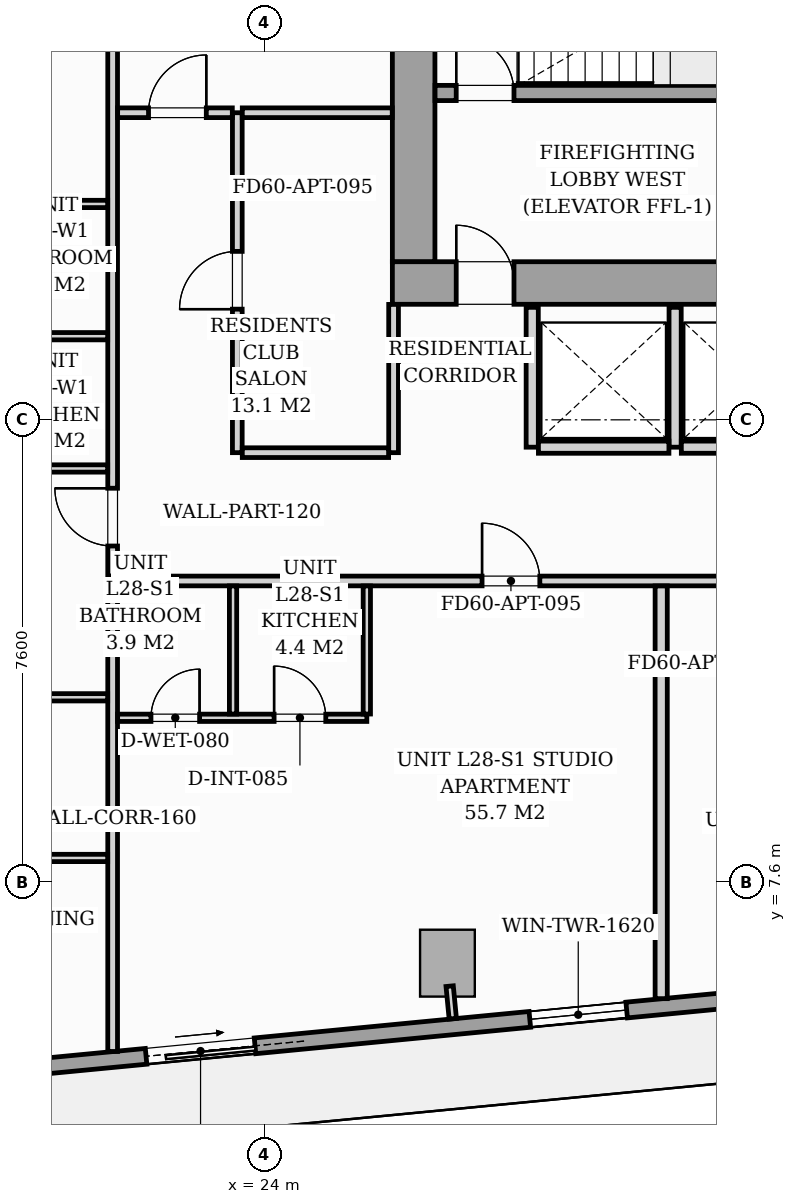
"""IFC4 building model, lengths in metres.
Left out: names, types, materials, properties, quantities, classifications, styles, units other than length and angle.
Written with IfcOpenShell. Run it as: python <this file> out.ifc"""

import sys

from ifc_helpers import new_model, si_unit, direction, frame, frame_2d, origin, origin_2d, place, context, subcontext, project, spatial, rectangle, i_section, extrude, source, transform, mapped, element, fill, save


model = new_model("IFC4")
c1 = context("Model", 3, precision=1e-05, world=origin(), true_north=direction((0.0, 1.0)))
c2 = subcontext(c1, "Body", "Model", "MODEL_VIEW")
j1 = project(units=[si_unit("LENGTHUNIT", "METRE"), si_unit("PLANEANGLEUNIT", "RADIAN")], contexts=[c1])
p1 = place(None, origin())
s1 = spatial("IfcSite", under=j1, at=p1, CompositionType="ELEMENT")
p2 = place(p1, origin())
s2 = spatial("IfcBuilding", under=s1, at=p2, CompositionType="ELEMENT")
p3 = place(p2, frame((0.0, 0.0, 100.2)))
s3 = spatial("IfcBuildingStorey", under=s2, at=p3, CompositionType="ELEMENT", Elevation=100.2)
m1 = source(origin(), c2, "Body", "SweptSolid", [
    extrude(i_section(OverallWidth=0.427, OverallDepth=0.483, WebThickness=0.051, FlangeThickness=0.082, FilletRadius=0.018, at=origin_2d()), origin(), (0.0, 0.0, 1.0), 3.196),
])
p4 = place(p3, frame((26.4, 17.4, 0.002), z_axis=(0.0, 0.0, 1.0), x_axis=(1.0, 0.0, 0.0)))
e1 = element("IfcColumn", 1, at=p4, inside=s3, PredefinedType="PILASTER", context=c2, shape_type="MappedRepresentation", body=[
    mapped(m1, transform((0.0, 0.0, 0.0), scale=1.0)),
])
m2 = source(origin(), c2, "Body", "SweptSolid", [
    extrude(rectangle(XDim=0.9, YDim=1.1, at=origin_2d()), origin(), (0.0, 0.0, 1.0), 3.196),
])
p5 = place(p3, frame((27.006, 6.265, 0.002), z_axis=(0.0, 0.0, 1.0), x_axis=(0.995396198367, 0.09584575252, 0.0)))
e2 = element("IfcColumn", 2, at=p5, inside=s3, PredefinedType="COLUMN", context=c2, shape_type="MappedRepresentation", body=[
    mapped(m2, transform((0.0, 0.0, 0.0), scale=1.0)),
])
p6 = place(p3, frame((31.994, 5.69, 0.0), z_axis=(0.0, 0.0, 1.0), x_axis=(-0.995396521236, -0.095842399342, 0.0)))
e3 = element("IfcWall", 3, at=p6, inside=s3, PredefinedType="STANDARD", context=c2, shape_type="SweptSolid", body=[
    extrude(rectangle(XDim=19.11, YDim=0.26, at=frame_2d((9.555, 0.0))), origin(), (0.0, 0.0, 1.0), 2.94),
])
p7 = place(p6, frame((8.19, 0.0, 0.0)))
e4 = element("IfcOpeningElement", 4, at=p7, cuts=e3, PredefinedType="OPENING", context=c2, shape_type="SweptSolid", body=[
    extrude(rectangle(XDim=1.8, YDim=2.06, at=frame_2d((0.9, 1.03))), frame((0.0, 0.14, 0.0), z_axis=(0.0, -1.0, 0.0), x_axis=(1.0, 0.0, 0.0)), (0.0, 0.0, 1.0), 0.28),
])
p8 = place(p6, frame((2.05, 0.0, 0.65)))
e5 = element("IfcOpeningElement", 5, at=p8, cuts=e3, PredefinedType="OPENING", context=c2, shape_type="SweptSolid", body=[
    extrude(rectangle(XDim=1.6, YDim=1.5, at=frame_2d((0.8, 0.75))), frame((0.0, 0.14, 0.0), z_axis=(0.0, -1.0, 0.0), x_axis=(1.0, 0.0, 0.0)), (0.0, 0.0, 1.0), 0.28),
])
p9 = place(p3, frame((26.1, 17.45, 0.0), z_axis=(0.0, 0.0, 1.0), x_axis=(1.0, 0.0, 0.0)))
e6 = element("IfcWall", 6, at=p9, inside=s3, PredefinedType="SHEAR", context=c2, shape_type="SweptSolid", body=[
    extrude(rectangle(XDim=19.8, YDim=0.7, at=frame_2d((9.9, 0.0))), origin(), (0.0, 0.0, 1.0), 3.2),
])
p10 = place(p9, frame((1.05, 0.0, 0.0)))
e7 = element("IfcOpeningElement", 7, at=p10, cuts=e6, PredefinedType="OPENING", context=c2, shape_type="SweptSolid", body=[
    extrude(rectangle(XDim=0.95, YDim=2.06, at=frame_2d((0.475, 1.03))), frame((0.0, 0.36, 0.0), z_axis=(0.0, -1.0, 0.0), x_axis=(1.0, 0.0, 0.0)), (0.0, 0.0, 1.0), 0.72),
])
p11 = place(p9, frame((9.48, 0.0, 0.0)))
e8 = element("IfcOpeningElement", 8, at=p11, cuts=e6, PredefinedType="OPENING", context=c2, shape_type="SweptSolid", body=[
    extrude(rectangle(XDim=0.85, YDim=2.0, at=frame_2d((0.425, 1.0))), frame((0.0, 0.36, 0.0), z_axis=(0.0, -1.0, 0.0), x_axis=(1.0, 0.0, 0.0)), (0.0, 0.0, 1.0), 0.72),
])
p12 = place(p9, frame((17.65, 0.0, 0.0)))
e9 = element("IfcOpeningElement", 9, at=p12, cuts=e6, PredefinedType="OPENING", context=c2, shape_type="SweptSolid", body=[
    extrude(rectangle(XDim=0.95, YDim=2.06, at=frame_2d((0.475, 1.03))), frame((0.0, 0.36, 0.0), z_axis=(0.0, -1.0, 0.0), x_axis=(1.0, 0.0, 0.0)), (0.0, 0.0, 1.0), 0.72),
])
p13 = place(p3, frame((26.45, 17.802, 0.0), z_axis=(0.0, 0.0, 1.0), x_axis=(0.0, 1.0, 0.0)))
e10 = element("IfcWall", 10, at=p13, inside=s3, PredefinedType="SHEAR", context=c2, shape_type="SweptSolid", body=[
    extrude(rectangle(XDim=5.796, YDim=0.7, at=frame_2d((2.898, 0.0))), origin(), (0.0, 0.0, 1.0), 3.2),
])
p14 = place(p3, frame((26.802, 20.575, 0.0), z_axis=(0.0, 0.0, 1.0), x_axis=(1.0, 0.0, 0.0)))
e11 = element("IfcWall", 11, at=p14, inside=s3, PredefinedType="SOLIDWALL", context=c2, shape_type="SweptSolid", body=[
    extrude(rectangle(XDim=8.148, YDim=0.25, at=frame_2d((4.074, 0.0))), origin(), (0.0, 0.0, 1.0), 3.2),
])
p15 = place(p14, frame((0.348, 0.0, 0.0)))
e12 = element("IfcOpeningElement", 12, at=p15, cuts=e11, PredefinedType="OPENING", context=c2, shape_type="SweptSolid", body=[
    extrude(rectangle(XDim=0.95, YDim=2.06, at=frame_2d((0.475, 1.03))), frame((0.0, 0.135, 0.0), z_axis=(0.0, -1.0, 0.0), x_axis=(1.0, 0.0, 0.0)), (0.0, 0.0, 1.0), 0.27),
])
for number, where, z_axis, x_axis in (
    (13, (28.4, 14.75, 0.0), (0.0, 0.0, 1.0), (0.0, 1.0, 0.0)),
    (14, (30.75, 14.75, 0.0), (0.0, 0.0, 1.0), (0.0, 1.0, 0.0)),
):
    element("IfcWall", number, at=place(p3, frame(where, z_axis=z_axis, x_axis=x_axis)), inside=s3, PredefinedType="PARTITIONING", context=c2, shape_type="SweptSolid", body=[
        extrude(rectangle(XDim=2.3, YDim=0.2, at=frame_2d((1.15, 0.0))), origin(), (0.0, 0.0, 1.0), 2.94),
    ])
for number, where, z_axis, x_axis in (
    (15, (28.502, 14.75, 0.0), (0.0, 0.0, 1.0), (1.0, 0.0, 0.0)),
    (16, (30.852, 14.75, 0.0), (0.0, 0.0, 1.0), (1.0, 0.0, 0.0)),
):
    element("IfcWall", number, at=place(p3, frame(where, z_axis=z_axis, x_axis=x_axis)), inside=s3, PredefinedType="PARTITIONING", context=c2, shape_type="SweptSolid", body=[
        extrude(rectangle(XDim=2.146, YDim=0.2, at=frame_2d((1.073, 0.0))), origin(), (0.0, 0.0, 1.0), 2.94),
    ])
p16 = place(p3, frame((21.5, 12.55, 0.0), z_axis=(0.0, 0.0, 1.0), x_axis=(1.0, 0.0, 0.0)))
e17 = element("IfcWall", 17, at=p16, inside=s3, PredefinedType="PARTITIONING", context=c2, shape_type="SweptSolid", body=[
    extrude(rectangle(XDim=24.38, YDim=0.16, at=frame_2d((12.19, 0.0))), origin(), (0.0, 0.0, 1.0), 2.94),
])
p17 = place(p16, frame((6.075, 0.0, 0.0)))
e18 = element("IfcOpeningElement", 18, at=p17, cuts=e17, PredefinedType="OPENING", context=c2, shape_type="SweptSolid", body=[
    extrude(rectangle(XDim=0.95, YDim=2.06, at=frame_2d((0.475, 1.03))), frame((0.0, 0.09, 0.0), z_axis=(0.0, -1.0, 0.0), x_axis=(1.0, 0.0, 0.0)), (0.0, 0.0, 1.0), 0.18),
])
p18 = place(p16, frame((10.519, 0.0, 0.0)))
e19 = element("IfcOpeningElement", 19, at=p18, cuts=e17, PredefinedType="OPENING", context=c2, shape_type="SweptSolid", body=[
    extrude(rectangle(XDim=0.95, YDim=2.06, at=frame_2d((0.475, 1.03))), frame((0.0, 0.09, 0.0), z_axis=(0.0, -1.0, 0.0), x_axis=(1.0, 0.0, 0.0)), (0.0, 0.0, 1.0), 0.18),
])
p19 = place(p16, frame((18.208, 0.0, 0.0)))
e20 = element("IfcOpeningElement", 20, at=p19, cuts=e17, PredefinedType="OPENING", context=c2, shape_type="SweptSolid", body=[
    extrude(rectangle(XDim=0.95, YDim=2.06, at=frame_2d((0.475, 1.03))), frame((0.0, 0.09, 0.0), z_axis=(0.0, -1.0, 0.0), x_axis=(1.0, 0.0, 0.0)), (0.0, 0.0, 1.0), 0.18),
])
p20 = place(p3, frame((21.5, 4.812, 0.0), z_axis=(0.0, 0.0, 1.0), x_axis=(0.0, 1.0, 0.0)))
e21 = element("IfcWall", 21, at=p20, inside=s3, PredefinedType="PARTITIONING", context=c2, shape_type="SweptSolid", body=[
    extrude(rectangle(XDim=7.656, YDim=0.16, at=frame_2d((3.828, 0.0))), origin(), (0.0, 0.0, 1.0), 2.94),
])
p21 = place(p3, frame((21.5, 12.632, 0.0), z_axis=(0.0, 0.0, 1.0), x_axis=(0.0, 1.0, 0.0)))
e22 = element("IfcWall", 22, at=p21, inside=s3, PredefinedType="PARTITIONING", context=c2, shape_type="SweptSolid", body=[
    extrude(rectangle(XDim=11.747, YDim=0.16, at=frame_2d((5.873, 0.0))), origin(), (0.0, 0.0, 1.0), 2.94),
])
p22 = place(p21, frame((0.493, 0.0, 0.0)))
e23 = element("IfcOpeningElement", 23, at=p22, cuts=e22, PredefinedType="OPENING", context=c2, shape_type="SweptSolid", body=[
    extrude(rectangle(XDim=0.95, YDim=2.06, at=frame_2d((0.475, 1.03))), frame((0.0, 0.09, 0.0), z_axis=(0.0, -1.0, 0.0), x_axis=(1.0, 0.0, 0.0)), (0.0, 0.0, 1.0), 0.18),
])
p23 = place(p3, frame((21.582, 10.3, 0.0), z_axis=(0.0, 0.0, 1.0), x_axis=(1.0, 0.0, 0.0)))
e24 = element("IfcWall", 24, at=p23, inside=s3, PredefinedType="PARTITIONING", context=c2, shape_type="SweptSolid", body=[
    extrude(rectangle(XDim=4.098, YDim=0.12, at=frame_2d((2.049, 0.0))), origin(), (0.0, 0.0, 1.0), 2.94),
])
p24 = place(p23, frame((0.548, 0.0, 0.0)))
e25 = element("IfcOpeningElement", 25, at=p24, cuts=e24, PredefinedType="OPENING", context=c2, shape_type="SweptSolid", body=[
    extrude(rectangle(XDim=0.8, YDim=2.02, at=frame_2d((0.4, 1.01))), frame((0.0, 0.07, 0.0), z_axis=(0.0, -1.0, 0.0), x_axis=(1.0, 0.0, 0.0)), (0.0, 0.0, 1.0), 0.14),
])
p25 = place(p23, frame((2.573, 0.0, 0.0)))
e26 = element("IfcOpeningElement", 26, at=p25, cuts=e24, PredefinedType="OPENING", context=c2, shape_type="SweptSolid", body=[
    extrude(rectangle(XDim=0.85, YDim=2.05, at=frame_2d((0.425, 1.025))), frame((0.0, 0.07, 0.0), z_axis=(0.0, -1.0, 0.0), x_axis=(1.0, 0.0, 0.0)), (0.0, 0.0, 1.0), 0.14),
])
for number, where, z_axis, x_axis in (
    (27, (25.68, 10.362, 0.0), (0.0, 0.0, 1.0), (0.0, 1.0, 0.0)),
    (28, (23.48, 10.362, 0.0), (0.0, 0.0, 1.0), (0.0, 1.0, 0.0)),
):
    element("IfcWall", number, at=place(p3, frame(where, z_axis=z_axis, x_axis=x_axis)), inside=s3, PredefinedType="PARTITIONING", context=c2, shape_type="SweptSolid", body=[
        extrude(rectangle(XDim=2.106, YDim=0.12, at=frame_2d((1.053, 0.0))), origin(), (0.0, 0.0, 1.0), 2.94),
    ])
p26 = place(p3, frame((30.521, 5.681, 0.0), z_axis=(0.0, 0.0, 1.0), x_axis=(0.0, 1.0, 0.0)))
e29 = element("IfcWall", 29, at=p26, inside=s3, PredefinedType="PARTITIONING", context=c2, shape_type="SweptSolid", body=[
    extrude(rectangle(XDim=6.787, YDim=0.2, at=frame_2d((3.394, 0.0))), origin(), (0.0, 0.0, 1.0), 2.94),
])
for number, where, z_axis, x_axis in (
    (30, (19.162, 16.575, 0.0), (0.0, 0.0, 1.0), (1.0, 0.0, 0.0)),
    (31, (19.162, 14.4, 0.0), (0.0, 0.0, 1.0), (1.0, 0.0, 0.0)),
    (32, (19.162, 18.75, 0.0), (0.0, 0.0, 1.0), (1.0, 0.0, 0.0)),
):
    element("IfcWall", number, at=place(p3, frame(where, z_axis=z_axis, x_axis=x_axis)), inside=s3, PredefinedType="PARTITIONING", context=c2, shape_type="SweptSolid", body=[
        extrude(rectangle(XDim=2.256, YDim=0.12, at=frame_2d((1.128, 0.0))), origin(), (0.0, 0.0, 1.0), 2.94),
    ])
p27 = place(p3, frame((10.142, 7.995, 0.0), z_axis=(0.0, 0.0, 1.0), x_axis=(1.0, 0.0, 0.0)))
e33 = element("IfcWall", 33, at=p27, inside=s3, PredefinedType="PARTITIONING", context=c2, shape_type="SweptSolid", body=[
    extrude(rectangle(XDim=11.276, YDim=0.12, at=frame_2d((5.638, 0.0))), origin(), (0.0, 0.0, 1.0), 2.94),
])
p28 = place(p27, frame((6.481, 0.0, 0.0)))
e34 = element("IfcOpeningElement", 34, at=p28, cuts=e33, PredefinedType="OPENING", context=c2, shape_type="SweptSolid", body=[
    extrude(rectangle(XDim=0.85, YDim=2.05, at=frame_2d((0.425, 1.025))), frame((0.0, 0.07, 0.0), z_axis=(0.0, -1.0, 0.0), x_axis=(1.0, 0.0, 0.0)), (0.0, 0.0, 1.0), 0.14),
])
p29 = place(p3, frame((9.888, 10.637, 0.0), z_axis=(0.0, 0.0, 1.0), x_axis=(1.0, 0.0, 0.0)))
e35 = element("IfcWall", 35, at=p29, inside=s3, PredefinedType="PARTITIONING", context=c2, shape_type="SweptSolid", body=[
    extrude(rectangle(XDim=11.53, YDim=0.12, at=frame_2d((5.765, 0.0))), origin(), (0.0, 0.0, 1.0), 2.94),
])
p30 = place(p29, frame((6.735, 0.0, 0.0)))
e36 = element("IfcOpeningElement", 36, at=p30, cuts=e35, PredefinedType="OPENING", context=c2, shape_type="SweptSolid", body=[
    extrude(rectangle(XDim=0.85, YDim=2.05, at=frame_2d((0.425, 1.025))), frame((0.0, 0.07, 0.0), z_axis=(0.0, -1.0, 0.0), x_axis=(1.0, 0.0, 0.0)), (0.0, 0.0, 1.0), 0.14),
])
p31 = place(p3, frame((23.55, 14.66, 0.0), z_axis=(0.0, 0.0, 1.0), x_axis=(0.0, 1.0, 0.0)))
e37 = element("IfcWall", 37, at=p31, inside=s3, PredefinedType="PARTITIONING", context=c2, shape_type="SweptSolid", body=[
    extrude(rectangle(XDim=5.59, YDim=0.16, at=frame_2d((2.795, 0.0))), origin(), (0.0, 0.0, 1.0), 2.94),
])
p32 = place(p31, frame((2.36, 0.0, 0.0)))
e38 = element("IfcOpeningElement", 38, at=p32, cuts=e37, PredefinedType="OPENING", context=c2, shape_type="SweptSolid", body=[
    extrude(rectangle(XDim=0.95, YDim=2.06, at=frame_2d((0.475, 1.03))), frame((0.0, 0.09, 0.0), z_axis=(0.0, -1.0, 0.0), x_axis=(1.0, 0.0, 0.0)), (0.0, 0.0, 1.0), 0.18),
])
p33 = place(p3, frame((21.582, 20.25, 0.0), z_axis=(0.0, 0.0, 1.0), x_axis=(1.0, 0.0, 0.0)))
e39 = element("IfcWall", 39, at=p33, inside=s3, PredefinedType="PARTITIONING", context=c2, shape_type="SweptSolid", body=[
    extrude(rectangle(XDim=1.886, YDim=0.16, at=frame_2d((0.943, 0.0))), origin(), (0.0, 0.0, 1.0), 2.94),
])
p34 = place(p33, frame((0.508, 0.0, 0.0)))
e40 = element("IfcOpeningElement", 40, at=p34, cuts=e39, PredefinedType="OPENING", context=c2, shape_type="SweptSolid", body=[
    extrude(rectangle(XDim=0.95, YDim=2.06, at=frame_2d((0.475, 1.03))), frame((0.0, 0.09, 0.0), z_axis=(0.0, -1.0, 0.0), x_axis=(1.0, 0.0, 0.0)), (0.0, 0.0, 1.0), 0.18),
])
p35 = place(p3, frame((23.632, 20.25, 0.0), z_axis=(0.0, 0.0, 1.0), x_axis=(1.0, 0.0, 0.0)))
e41 = element("IfcWall", 41, at=p35, inside=s3, PredefinedType="PARTITIONING", context=c2, shape_type="SweptSolid", body=[
    extrude(rectangle(XDim=2.466, YDim=0.16, at=frame_2d((1.233, 0.0))), origin(), (0.0, 0.0, 1.0), 2.94),
])
p36 = place(p3, frame((26.12, 14.66, 0.0), z_axis=(0.0, 0.0, 1.0), x_axis=(0.0, 1.0, 0.0)))
e42 = element("IfcWall", 42, at=p36, inside=s3, PredefinedType="PARTITIONING", context=c2, shape_type="SweptSolid", body=[
    extrude(rectangle(XDim=2.438, YDim=0.16, at=frame_2d((1.219, 0.0))), origin(), (0.0, 0.0, 1.0), 2.94),
])
p37 = place(p3, frame((23.632, 14.66, 0.0), z_axis=(0.0, 0.0, 1.0), x_axis=(1.0, 0.0, 0.0)))
e43 = element("IfcWall", 43, at=p37, inside=s3, PredefinedType="PARTITIONING", context=c2, shape_type="SweptSolid", body=[
    extrude(rectangle(XDim=2.406, YDim=0.16, at=frame_2d((1.203, 0.0))), origin(), (0.0, 0.0, 1.0), 2.94),
])
p38 = place(p3, frame((27.042, 5.887, 0.0), z_axis=(0.0, 0.0, 1.0), x_axis=(0.096222656154, -0.995359834654, 0.0)))
e44 = element("IfcWall", 44, at=p38, inside=s3, PredefinedType="PARTITIONING", context=c2, shape_type="SweptSolid", body=[
    extrude(rectangle(XDim=0.538, YDim=0.12, at=frame_2d((0.269, 0.0))), origin(), (0.0, 0.0, 1.0), 2.94),
])
m3 = source(origin(), c2, "Body", "SweptSolid", [
    extrude(rectangle(XDim=1.8, YDim=2.06, at=frame_2d((0.9, 1.03))), frame((0.0, 0.025, 0.0), z_axis=(0.0, -1.0, 0.0), x_axis=(1.0, 0.0, 0.0)), (0.0, 0.0, 1.0), 0.05),
])
p39 = place(p7, origin())
e45 = element("IfcDoor", 45, at=p39, inside=s3, OperationType="SLIDING_TO_LEFT", PredefinedType="DOOR", context=c2, shape_type="MappedRepresentation", body=[
    mapped(m3, transform((0.0, 0.0, 0.0), scale=1.0)),
])
fill(e4, e45)
m4 = source(origin(), c2, "Body", "SweptSolid", [
    extrude(rectangle(XDim=1.6, YDim=1.5, at=frame_2d((0.8, 0.75))), frame((0.0, 0.03, 0.0), z_axis=(0.0, -1.0, 0.0), x_axis=(1.0, 0.0, 0.0)), (0.0, 0.0, 1.0), 0.06),
])
p40 = place(p8, origin())
e46 = element("IfcWindow", 46, at=p40, inside=s3, PartitioningType="SINGLE_PANEL", PredefinedType="WINDOW", context=c2, shape_type="MappedRepresentation", body=[
    mapped(m4, transform((0.0, 0.0, 0.0), scale=1.0)),
])
fill(e5, e46)
m5 = source(origin(), c2, "Body", "SweptSolid", [
    extrude(rectangle(XDim=0.95, YDim=2.06, at=frame_2d((0.475, 1.03))), frame((0.0, 0.025, 0.0), z_axis=(0.0, -1.0, 0.0), x_axis=(1.0, 0.0, 0.0)), (0.0, 0.0, 1.0), 0.05),
])
p41 = place(p10, origin())
e47 = element("IfcDoor", 47, at=p41, inside=s3, OperationType="SINGLE_SWING_LEFT", PredefinedType="DOOR", context=c2, shape_type="MappedRepresentation", body=[
    mapped(m5, transform((0.0, 0.0, 0.0), scale=1.0)),
])
fill(e7, e47)
p42 = place(p15, origin())
e48 = element("IfcDoor", 48, at=p42, inside=s3, OperationType="SINGLE_SWING_LEFT", PredefinedType="DOOR", context=c2, shape_type="MappedRepresentation", body=[
    mapped(m5, transform((0.0, 0.0, 0.0), scale=1.0)),
])
fill(e12, e48)
m6 = source(origin(), c2, "Body", "SweptSolid", [
    extrude(rectangle(XDim=0.95, YDim=2.06, at=frame_2d((0.475, 1.03))), frame((0.0, 0.025, 0.0), z_axis=(0.0, -1.0, 0.0), x_axis=(1.0, 0.0, 0.0)), (0.0, 0.0, 1.0), 0.05),
])
p43 = place(p17, origin())
e49 = element("IfcDoor", 49, at=p43, inside=s3, OperationType="SINGLE_SWING_LEFT", PredefinedType="DOOR", context=c2, shape_type="MappedRepresentation", body=[
    mapped(m6, transform((0.0, 0.0, 0.0), scale=1.0)),
])
fill(e18, e49)
m7 = source(origin(), c2, "Body", "SweptSolid", [
    extrude(rectangle(XDim=0.8, YDim=2.02, at=frame_2d((0.4, 1.01))), frame((0.0, 0.025, 0.0), z_axis=(0.0, -1.0, 0.0), x_axis=(1.0, 0.0, 0.0)), (0.0, 0.0, 1.0), 0.05),
])
p44 = place(p24, origin())
e50 = element("IfcDoor", 50, at=p44, inside=s3, OperationType="SINGLE_SWING_RIGHT", PredefinedType="DOOR", context=c2, shape_type="MappedRepresentation", body=[
    mapped(m7, transform((0.0, 0.0, 0.0), scale=1.0)),
])
fill(e25, e50)
m8 = source(origin(), c2, "Body", "SweptSolid", [
    extrude(rectangle(XDim=0.85, YDim=2.05, at=frame_2d((0.425, 1.025))), frame((0.0, 0.025, 0.0), z_axis=(0.0, -1.0, 0.0), x_axis=(1.0, 0.0, 0.0)), (0.0, 0.0, 1.0), 0.05),
])
p45 = place(p25, origin())
e51 = element("IfcDoor", 51, at=p45, inside=s3, OperationType="SINGLE_SWING_LEFT", PredefinedType="DOOR", context=c2, shape_type="MappedRepresentation", body=[
    mapped(m8, transform((0.0, 0.0, 0.0), scale=1.0)),
])
fill(e26, e51)
p46 = place(p22, origin())
e52 = element("IfcDoor", 52, at=p46, inside=s3, OperationType="SINGLE_SWING_RIGHT", PredefinedType="DOOR", context=c2, shape_type="MappedRepresentation", body=[
    mapped(m6, transform((0.0, 0.0, 0.0), scale=1.0)),
])
fill(e23, e52)
p47 = place(p32, origin())
e53 = element("IfcDoor", 53, at=p47, inside=s3, OperationType="SINGLE_SWING_LEFT", PredefinedType="DOOR", context=c2, shape_type="MappedRepresentation", body=[
    mapped(m6, transform((0.0, 0.0, 0.0), scale=1.0)),
])
fill(e38, e53)
p48 = place(p34, origin())
e54 = element("IfcDoor", 54, at=p48, inside=s3, OperationType="SINGLE_SWING_RIGHT", PredefinedType="DOOR", context=c2, shape_type="MappedRepresentation", body=[
    mapped(m6, transform((0.0, 0.0, 0.0), scale=1.0)),
])
fill(e40, e54)
save(model, sys.argv[1])
